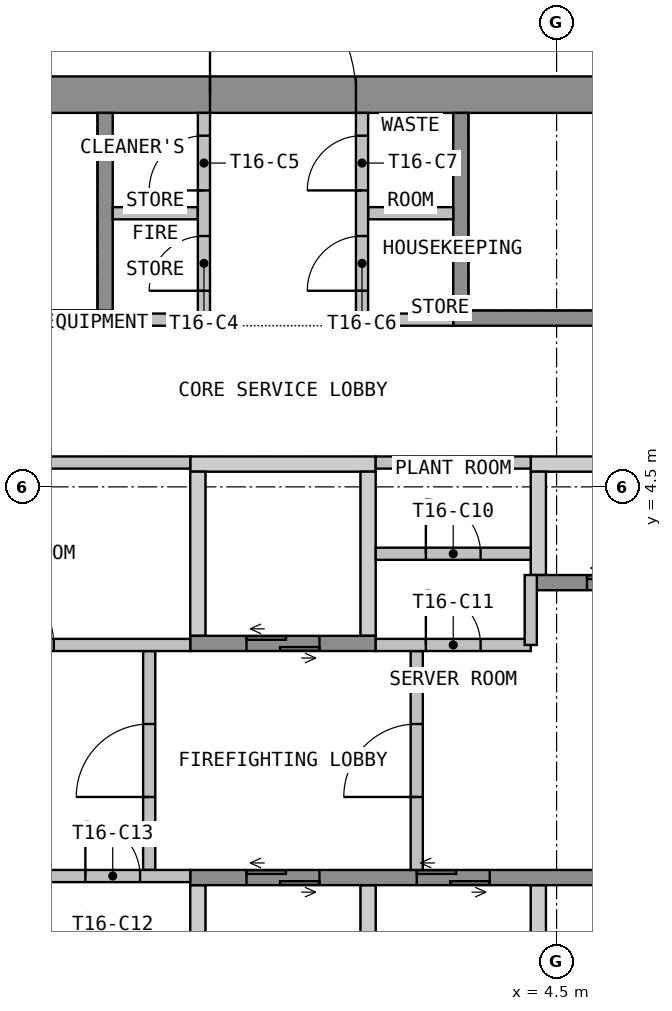
"""IFC4 building model, lengths in metres.
Left out: names, types, materials, properties, quantities, classifications, styles, units other than length and angle.
Written with IfcOpenShell. Run it as: python <this file> out.ifc"""

import sys

from ifc_helpers import new_model, si_unit, direction, frame, frame_2d, origin, place, context, subcontext, project, spatial, polyline, rectangle, outline, extrude, element, fill, save


model = new_model("IFC4")
c1 = context("Model", 3, precision=1e-05, world=origin(), true_north=direction((0.0, 1.0)))
c2 = subcontext(c1, "Body", "Model", "MODEL_VIEW")
j1 = project(units=[si_unit("LENGTHUNIT", "METRE"), si_unit("PLANEANGLEUNIT", "RADIAN")], contexts=[c1])
p1 = place(None, origin())
s1 = spatial("IfcSite", under=j1, at=p1, CompositionType="ELEMENT")
p2 = place(p1, origin())
s2 = spatial("IfcBuilding", under=s1, at=p2, CompositionType="ELEMENT")
p3 = place(p2, frame((0.0, 0.0, 219.0)))
s3 = spatial("IfcBuildingStorey", under=s2, at=p3, CompositionType="ELEMENT", Elevation=219.0)
p4 = place(p3, frame((-13.5, 10.95, 0.0), z_axis=(0.0, 0.0, 1.0), x_axis=(1.0, 0.0, 0.0)))
e1 = element("IfcWall", 1, at=p4, inside=s3, PredefinedType="SHEAR", context=c2, shape_type="SweptSolid", body=[
    extrude(rectangle(XDim=27.0, YDim=0.6, at=frame_2d((13.5, 0.0))), origin(), (0.0, 0.0, 1.0), 3.55),
])
p5 = place(p4, frame((12.3, 0.0, 0.0)))
e2 = element("IfcOpeningElement", 2, at=p5, cuts=e1, PredefinedType="OPENING", context=c2, shape_type="SweptSolid", body=[
    extrude(rectangle(XDim=2.4, YDim=2.1, at=frame_2d((1.2, 1.05))), frame((0.0, 0.31, 0.0), z_axis=(0.0, -1.0, 0.0), x_axis=(1.0, 0.0, 0.0)), (0.0, 0.0, 1.0), 0.62),
])
p6 = place(p4, frame((1.05, 0.0, 0.0)))
e3 = element("IfcOpeningElement", 3, at=p6, cuts=e1, PredefinedType="OPENING", context=c2, shape_type="SweptSolid", body=[
    extrude(rectangle(XDim=1.2, YDim=2.1, at=frame_2d((0.6, 1.05))), frame((0.0, 0.31, 0.0), z_axis=(0.0, -1.0, 0.0), x_axis=(1.0, 0.0, 0.0)), (0.0, 0.0, 1.0), 0.62),
])
p7 = place(p4, frame((24.75, 0.0, 0.0)))
e4 = element("IfcOpeningElement", 4, at=p7, cuts=e1, PredefinedType="OPENING", context=c2, shape_type="SweptSolid", body=[
    extrude(rectangle(XDim=1.2, YDim=2.1, at=frame_2d((0.6, 1.05))), frame((0.0, 0.31, 0.0), z_axis=(0.0, -1.0, 0.0), x_axis=(1.0, 0.0, 0.0)), (0.0, 0.0, 1.0), 0.62),
])
p8 = place(p3, origin())
e5 = element("IfcWall", 5, at=p8, inside=s3, PredefinedType="SHEAR", context=c2, shape_type="SweptSolid", body=[
    extrude(outline(polyline([(-1.525, 4.75), (1.525, 4.75), (1.525, 5.0), (-1.525, 5.0), (-1.525, 4.75)])), origin(), (0.0, 0.0, 1.0), 3.55),
])
p9 = place(p3, origin())
e6 = element("IfcWall", 6, at=p9, inside=s3, PredefinedType="SHEAR", context=c2, shape_type="SweptSolid", body=[
    extrude(outline(polyline([(4.075, 4.75), (12.9, 4.75), (12.9, 5.0), (4.075, 5.0), (4.075, 4.75)])), origin(), (0.0, 0.0, 1.0), 3.55),
])
p10 = place(p3, origin())
e7 = element("IfcWall", 7, at=p10, inside=s3, PredefinedType="SHEAR", context=c2, shape_type="SweptSolid", body=[
    extrude(outline(polyline([(-1.525, 2.05), (-1.275, 2.05), (-1.275, 4.75), (-1.525, 4.75), (-1.525, 2.05)])), origin(), (0.0, 0.0, 1.0), 3.55),
])
p11 = place(p3, origin())
e8 = element("IfcWall", 8, at=p11, inside=s3, PredefinedType="SHEAR", context=c2, shape_type="SweptSolid", body=[
    extrude(outline(polyline([(1.275, 2.05), (1.525, 2.05), (1.525, 4.75), (1.275, 4.75), (1.275, 2.05)])), origin(), (0.0, 0.0, 1.0), 3.55),
])
p12 = place(p3, origin())
e9 = element("IfcWall", 9, at=p12, inside=s3, PredefinedType="SHEAR", context=c2, shape_type="SweptSolid", body=[
    extrude(outline(polyline([(4.075, 3.05), (4.325, 3.05), (4.325, 4.75), (4.075, 4.75), (4.075, 3.05)])), origin(), (0.0, 0.0, 1.0), 3.55),
])
p13 = place(p3, frame((-1.525, 1.925, 0.0), z_axis=(0.0, 0.0, 1.0), x_axis=(1.0, 0.0, 0.0)))
e10 = element("IfcWall", 10, at=p13, inside=s3, PredefinedType="SHEAR", context=c2, shape_type="SweptSolid", body=[
    extrude(rectangle(XDim=3.05, YDim=0.25, at=frame_2d((1.525, 0.0))), origin(), (0.0, 0.0, 1.0), 3.55),
])
p14 = place(p13, frame((0.925, 0.0, 0.0)))
e11 = element("IfcOpeningElement", 11, at=p14, cuts=e10, PredefinedType="OPENING", context=c2, shape_type="SweptSolid", body=[
    extrude(rectangle(XDim=1.2, YDim=2.1, at=frame_2d((0.6, 1.05))), frame((0.0, 0.135, 0.0), z_axis=(0.0, -1.0, 0.0), x_axis=(1.0, 0.0, 0.0)), (0.0, 0.0, 1.0), 0.27),
])
p15 = place(p3, frame((4.075, 2.925, 0.0), z_axis=(0.0, 0.0, 1.0), x_axis=(1.0, 0.0, 0.0)))
e12 = element("IfcWall", 12, at=p15, inside=s3, PredefinedType="SHEAR", context=c2, shape_type="SweptSolid", body=[
    extrude(rectangle(XDim=5.85, YDim=0.25, at=frame_2d((2.925, 0.0))), origin(), (0.0, 0.0, 1.0), 3.55),
])
p16 = place(p15, frame((0.925, 0.0, 0.0)))
e13 = element("IfcOpeningElement", 13, at=p16, cuts=e12, PredefinedType="OPENING", context=c2, shape_type="SweptSolid", body=[
    extrude(rectangle(XDim=1.2, YDim=2.1, at=frame_2d((0.6, 1.05))), frame((0.0, 0.135, 0.0), z_axis=(0.0, -1.0, 0.0), x_axis=(1.0, 0.0, 0.0)), (0.0, 0.0, 1.0), 0.27),
])
p17 = place(p15, frame((3.725, 0.0, 0.0)))
e14 = element("IfcOpeningElement", 14, at=p17, cuts=e12, PredefinedType="OPENING", context=c2, shape_type="SweptSolid", body=[
    extrude(rectangle(XDim=1.2, YDim=2.1, at=frame_2d((0.6, 1.05))), frame((0.0, 0.135, 0.0), z_axis=(0.0, -1.0, 0.0), x_axis=(1.0, 0.0, 0.0)), (0.0, 0.0, 1.0), 0.27),
])
p18 = place(p3, origin())
e15 = element("IfcWall", 15, at=p18, inside=s3, PredefinedType="SHEAR", context=c2, shape_type="SweptSolid", body=[
    extrude(outline(polyline([(-1.525, -4.75), (-1.275, -4.75), (-1.275, -2.05), (-1.525, -2.05), (-1.525, -4.75)])), origin(), (0.0, 0.0, 1.0), 3.55),
])
p19 = place(p3, origin())
e16 = element("IfcWall", 16, at=p19, inside=s3, PredefinedType="SHEAR", context=c2, shape_type="SweptSolid", body=[
    extrude(outline(polyline([(1.275, -4.75), (1.525, -4.75), (1.525, -2.05), (1.275, -2.05), (1.275, -4.75)])), origin(), (0.0, 0.0, 1.0), 3.55),
])
p20 = place(p3, origin())
e17 = element("IfcWall", 17, at=p20, inside=s3, PredefinedType="SHEAR", context=c2, shape_type="SweptSolid", body=[
    extrude(outline(polyline([(4.075, -4.75), (4.325, -4.75), (4.325, -2.05), (4.075, -2.05), (4.075, -4.75)])), origin(), (0.0, 0.0, 1.0), 3.55),
])
p21 = place(p3, frame((-1.525, -1.925, 0.0), z_axis=(0.0, 0.0, 1.0), x_axis=(1.0, 0.0, 0.0)))
e18 = element("IfcWall", 18, at=p21, inside=s3, PredefinedType="SHEAR", context=c2, shape_type="SweptSolid", body=[
    extrude(rectangle(XDim=14.425, YDim=0.25, at=frame_2d((7.212, 0.0))), origin(), (0.0, 0.0, 1.0), 3.55),
])
p22 = place(p21, frame((0.925, 0.0, 0.0)))
e19 = element("IfcOpeningElement", 19, at=p22, cuts=e18, PredefinedType="OPENING", context=c2, shape_type="SweptSolid", body=[
    extrude(rectangle(XDim=1.2, YDim=2.1, at=frame_2d((0.6, 1.05))), frame((0.0, 0.135, 0.0), z_axis=(0.0, -1.0, 0.0), x_axis=(1.0, 0.0, 0.0)), (0.0, 0.0, 1.0), 0.27),
])
p23 = place(p21, frame((3.725, 0.0, 0.0)))
e20 = element("IfcOpeningElement", 20, at=p23, cuts=e18, PredefinedType="OPENING", context=c2, shape_type="SweptSolid", body=[
    extrude(rectangle(XDim=1.2, YDim=2.1, at=frame_2d((0.6, 1.05))), frame((0.0, 0.135, 0.0), z_axis=(0.0, -1.0, 0.0), x_axis=(1.0, 0.0, 0.0)), (0.0, 0.0, 1.0), 0.27),
])
p24 = place(p3, frame((-2.2, -1.8, 0.0), z_axis=(0.0, 0.0, 1.0), x_axis=(0.0, 1.0, 0.0)))
e21 = element("IfcWall", 21, at=p24, inside=s3, PredefinedType="PARTITIONING", context=c2, shape_type="SweptSolid", body=[
    extrude(rectangle(XDim=3.6, YDim=0.2, at=frame_2d((1.8, 0.0))), origin(), (0.0, 0.0, 1.0), 3.55),
])
p25 = place(p24, frame((1.2, 0.0, 0.0)))
e22 = element("IfcOpeningElement", 22, at=p25, cuts=e21, PredefinedType="OPENING", context=c2, shape_type="SweptSolid", body=[
    extrude(rectangle(XDim=1.2, YDim=2.1, at=frame_2d((0.6, 1.05))), frame((0.0, 0.11, 0.0), z_axis=(0.0, -1.0, 0.0), x_axis=(1.0, 0.0, 0.0)), (0.0, 0.0, 1.0), 0.22),
])
p26 = place(p3, frame((2.2, -1.8, 0.0), z_axis=(0.0, 0.0, 1.0), x_axis=(0.0, 1.0, 0.0)))
e23 = element("IfcWall", 23, at=p26, inside=s3, PredefinedType="PARTITIONING", context=c2, shape_type="SweptSolid", body=[
    extrude(rectangle(XDim=3.6, YDim=0.2, at=frame_2d((1.8, 0.0))), origin(), (0.0, 0.0, 1.0), 3.55),
])
p27 = place(p26, frame((1.2, 0.0, 0.0)))
e24 = element("IfcOpeningElement", 24, at=p27, cuts=e23, PredefinedType="OPENING", context=c2, shape_type="SweptSolid", body=[
    extrude(rectangle(XDim=1.2, YDim=2.1, at=frame_2d((0.6, 1.05))), frame((0.0, 0.11, 0.0), z_axis=(0.0, -1.0, 0.0), x_axis=(1.0, 0.0, 0.0)), (0.0, 0.0, 1.0), 0.22),
])
p28 = place(p3, frame((-12.9, 7.275, 0.0), z_axis=(0.0, 0.0, 1.0), x_axis=(1.0, 0.0, 0.0)))
e25 = element("IfcWall", 25, at=p28, inside=s3, PredefinedType="SHEAR", context=c2, shape_type="SweptSolid", body=[
    extrude(rectangle(XDim=10.1, YDim=0.25, at=frame_2d((5.05, 0.0))), origin(), (0.0, 0.0, 1.0), 3.55),
])
p29 = place(p28, frame((0.45, 0.0, 0.0)))
e26 = element("IfcOpeningElement", 26, at=p29, cuts=e25, PredefinedType="OPENING", context=c2, shape_type="SweptSolid", body=[
    extrude(rectangle(XDim=1.2, YDim=2.1, at=frame_2d((0.6, 1.05))), frame((0.0, 0.135, 0.0), z_axis=(0.0, -1.0, 0.0), x_axis=(1.0, 0.0, 0.0)), (0.0, 0.0, 1.0), 0.27),
])
p30 = place(p3, frame((-2.925, 7.4, 0.0), z_axis=(0.0, 0.0, 1.0), x_axis=(0.0, 1.0, 0.0)))
e27 = element("IfcWall", 27, at=p30, inside=s3, PredefinedType="SHEAR", context=c2, shape_type="SweptSolid", body=[
    extrude(rectangle(XDim=3.25, YDim=0.25, at=frame_2d((1.625, 0.0))), origin(), (0.0, 0.0, 1.0), 3.55),
])
p31 = place(p3, frame((2.8, 7.275, 0.0), z_axis=(0.0, 0.0, 1.0), x_axis=(1.0, 0.0, 0.0)))
e28 = element("IfcWall", 28, at=p31, inside=s3, PredefinedType="SHEAR", context=c2, shape_type="SweptSolid", body=[
    extrude(rectangle(XDim=10.1, YDim=0.25, at=frame_2d((5.05, 0.0))), origin(), (0.0, 0.0, 1.0), 3.55),
])
p32 = place(p31, frame((8.45, 0.0, 0.0)))
e29 = element("IfcOpeningElement", 29, at=p32, cuts=e28, PredefinedType="OPENING", context=c2, shape_type="SweptSolid", body=[
    extrude(rectangle(XDim=1.2, YDim=2.1, at=frame_2d((0.6, 1.05))), frame((0.0, 0.135, 0.0), z_axis=(0.0, -1.0, 0.0), x_axis=(1.0, 0.0, 0.0)), (0.0, 0.0, 1.0), 0.27),
])
p33 = place(p3, frame((2.925, 7.4, 0.0), z_axis=(0.0, 0.0, 1.0), x_axis=(0.0, 1.0, 0.0)))
e30 = element("IfcWall", 30, at=p33, inside=s3, PredefinedType="SHEAR", context=c2, shape_type="SweptSolid", body=[
    extrude(rectangle(XDim=3.25, YDim=0.25, at=frame_2d((1.625, 0.0))), origin(), (0.0, 0.0, 1.0), 3.55),
])
for number, where, z_axis, x_axis in (
    (31, (-2.8, 7.25, 0.0), (0.0, 0.0, 1.0), (1.0, 0.0, 0.0)),
    (32, (-2.8, 9.0, 0.0), (0.0, 0.0, 1.0), (1.0, 0.0, 0.0)),
    (33, (1.4, 7.25, 0.0), (0.0, 0.0, 1.0), (1.0, 0.0, 0.0)),
    (34, (1.4, 9.0, 0.0), (0.0, 0.0, 1.0), (1.0, 0.0, 0.0)),
):
    element("IfcWall", number, at=place(p3, frame(where, z_axis=z_axis, x_axis=x_axis)), inside=s3, PredefinedType="PARTITIONING", context=c2, shape_type="SweptSolid", body=[
        extrude(rectangle(XDim=1.4, YDim=0.2, at=frame_2d((0.7, 0.0))), origin(), (0.0, 0.0, 1.0), 3.55),
    ])
p34 = place(p3, frame((-1.3, 7.15, 0.0), z_axis=(0.0, 0.0, 1.0), x_axis=(0.0, 1.0, 0.0)))
e35 = element("IfcWall", 35, at=p34, inside=s3, PredefinedType="PARTITIONING", context=c2, shape_type="SweptSolid", body=[
    extrude(rectangle(XDim=3.5, YDim=0.2, at=frame_2d((1.75, 0.0))), origin(), (0.0, 0.0, 1.0), 3.55),
])
p35 = place(p34, frame((0.575, 0.0, 0.0)))
e36 = element("IfcOpeningElement", 36, at=p35, cuts=e35, PredefinedType="OPENING", context=c2, shape_type="SweptSolid", body=[
    extrude(rectangle(XDim=0.9, YDim=2.1, at=frame_2d((0.45, 1.05))), frame((0.0, 0.11, 0.0), z_axis=(0.0, -1.0, 0.0), x_axis=(1.0, 0.0, 0.0)), (0.0, 0.0, 1.0), 0.22),
])
p36 = place(p34, frame((2.225, 0.0, 0.0)))
e37 = element("IfcOpeningElement", 37, at=p36, cuts=e35, PredefinedType="OPENING", context=c2, shape_type="SweptSolid", body=[
    extrude(rectangle(XDim=0.9, YDim=2.1, at=frame_2d((0.45, 1.05))), frame((0.0, 0.11, 0.0), z_axis=(0.0, -1.0, 0.0), x_axis=(1.0, 0.0, 0.0)), (0.0, 0.0, 1.0), 0.22),
])
p37 = place(p3, frame((1.3, 7.15, 0.0), z_axis=(0.0, 0.0, 1.0), x_axis=(0.0, 1.0, 0.0)))
e38 = element("IfcWall", 38, at=p37, inside=s3, PredefinedType="PARTITIONING", context=c2, shape_type="SweptSolid", body=[
    extrude(rectangle(XDim=3.5, YDim=0.2, at=frame_2d((1.75, 0.0))), origin(), (0.0, 0.0, 1.0), 3.55),
])
p38 = place(p37, frame((0.575, 0.0, 0.0)))
e39 = element("IfcOpeningElement", 39, at=p38, cuts=e38, PredefinedType="OPENING", context=c2, shape_type="SweptSolid", body=[
    extrude(rectangle(XDim=0.9, YDim=2.1, at=frame_2d((0.45, 1.05))), frame((0.0, 0.11, 0.0), z_axis=(0.0, -1.0, 0.0), x_axis=(1.0, 0.0, 0.0)), (0.0, 0.0, 1.0), 0.22),
])
p39 = place(p37, frame((2.225, 0.0, 0.0)))
e40 = element("IfcOpeningElement", 40, at=p39, cuts=e38, PredefinedType="OPENING", context=c2, shape_type="SweptSolid", body=[
    extrude(rectangle(XDim=0.9, YDim=2.1, at=frame_2d((0.45, 1.05))), frame((0.0, 0.11, 0.0), z_axis=(0.0, -1.0, 0.0), x_axis=(1.0, 0.0, 0.0)), (0.0, 0.0, 1.0), 0.22),
])
p40 = place(p3, frame((-12.9, 1.9, 0.0), z_axis=(0.0, 0.0, 1.0), x_axis=(1.0, 0.0, 0.0)))
e41 = element("IfcWall", 41, at=p40, inside=s3, PredefinedType="PARTITIONING", context=c2, shape_type="SweptSolid", body=[
    extrude(rectangle(XDim=11.375, YDim=0.2, at=frame_2d((5.688, 0.0))), origin(), (0.0, 0.0, 1.0), 3.55),
])
p41 = place(p40, frame((2.244, 0.0, 0.0)))
e42 = element("IfcOpeningElement", 42, at=p41, cuts=e41, PredefinedType="OPENING", context=c2, shape_type="SweptSolid", body=[
    extrude(rectangle(XDim=1.2, YDim=2.1, at=frame_2d((0.6, 1.05))), frame((0.0, 0.11, 0.0), z_axis=(0.0, -1.0, 0.0), x_axis=(1.0, 0.0, 0.0)), (0.0, 0.0, 1.0), 0.22),
])
p42 = place(p40, frame((7.931, 0.0, 0.0)))
e43 = element("IfcOpeningElement", 43, at=p42, cuts=e41, PredefinedType="OPENING", context=c2, shape_type="SweptSolid", body=[
    extrude(rectangle(XDim=1.2, YDim=2.1, at=frame_2d((0.6, 1.05))), frame((0.0, 0.11, 0.0), z_axis=(0.0, -1.0, 0.0), x_axis=(1.0, 0.0, 0.0)), (0.0, 0.0, 1.0), 0.22),
])
p43 = place(p3, frame((-12.9, 4.9, 0.0), z_axis=(0.0, 0.0, 1.0), x_axis=(1.0, 0.0, 0.0)))
e44 = element("IfcWall", 44, at=p43, inside=s3, PredefinedType="PARTITIONING", context=c2, shape_type="SweptSolid", body=[
    extrude(rectangle(XDim=11.375, YDim=0.2, at=frame_2d((5.688, 0.0))), origin(), (0.0, 0.0, 1.0), 3.55),
])
p44 = place(p3, frame((1.525, 3.4, 0.0), z_axis=(0.0, 0.0, 1.0), x_axis=(1.0, 0.0, 0.0)))
e45 = element("IfcWall", 45, at=p44, inside=s3, PredefinedType="PARTITIONING", context=c2, shape_type="SweptSolid", body=[
    extrude(rectangle(XDim=2.55, YDim=0.2, at=frame_2d((1.275, 0.0))), origin(), (0.0, 0.0, 1.0), 3.55),
])
p45 = place(p44, frame((0.825, 0.0, 0.0)))
e46 = element("IfcOpeningElement", 46, at=p45, cuts=e45, PredefinedType="OPENING", context=c2, shape_type="SweptSolid", body=[
    extrude(rectangle(XDim=0.9, YDim=2.1, at=frame_2d((0.45, 1.05))), frame((0.0, 0.11, 0.0), z_axis=(0.0, -1.0, 0.0), x_axis=(1.0, 0.0, 0.0)), (0.0, 0.0, 1.0), 0.22),
])
p46 = place(p3, frame((1.525, 1.9, 0.0), z_axis=(0.0, 0.0, 1.0), x_axis=(1.0, 0.0, 0.0)))
e47 = element("IfcWall", 47, at=p46, inside=s3, PredefinedType="PARTITIONING", context=c2, shape_type="SweptSolid", body=[
    extrude(rectangle(XDim=2.55, YDim=0.2, at=frame_2d((1.275, 0.0))), origin(), (0.0, 0.0, 1.0), 3.55),
])
p47 = place(p46, frame((0.825, 0.0, 0.0)))
e48 = element("IfcOpeningElement", 48, at=p47, cuts=e47, PredefinedType="OPENING", context=c2, shape_type="SweptSolid", body=[
    extrude(rectangle(XDim=0.9, YDim=2.1, at=frame_2d((0.45, 1.05))), frame((0.0, 0.11, 0.0), z_axis=(0.0, -1.0, 0.0), x_axis=(1.0, 0.0, 0.0)), (0.0, 0.0, 1.0), 0.22),
])
p48 = place(p3, frame((1.525, 4.9, 0.0), z_axis=(0.0, 0.0, 1.0), x_axis=(1.0, 0.0, 0.0)))
e49 = element("IfcWall", 49, at=p48, inside=s3, PredefinedType="PARTITIONING", context=c2, shape_type="SweptSolid", body=[
    extrude(rectangle(XDim=2.55, YDim=0.2, at=frame_2d((1.275, 0.0))), origin(), (0.0, 0.0, 1.0), 3.55),
])
p49 = place(p3, frame((4.075, 1.9, 0.0), z_axis=(0.0, 0.0, 1.0), x_axis=(0.0, 1.0, 0.0)))
e50 = element("IfcWall", 50, at=p49, inside=s3, PredefinedType="PARTITIONING", context=c2, shape_type="SweptSolid", body=[
    extrude(rectangle(XDim=1.15, YDim=0.2, at=frame_2d((0.575, 0.0))), origin(), (0.0, 0.0, 1.0), 3.55),
])
p50 = place(p3, frame((-4.075, -1.9, 0.0), z_axis=(0.0, 0.0, 1.0), x_axis=(1.0, 0.0, 0.0)))
e51 = element("IfcWall", 51, at=p50, inside=s3, PredefinedType="PARTITIONING", context=c2, shape_type="SweptSolid", body=[
    extrude(rectangle(XDim=2.55, YDim=0.2, at=frame_2d((1.275, 0.0))), origin(), (0.0, 0.0, 1.0), 3.55),
])
p51 = place(p50, frame((0.825, 0.0, 0.0)))
e52 = element("IfcOpeningElement", 52, at=p51, cuts=e51, PredefinedType="OPENING", context=c2, shape_type="SweptSolid", body=[
    extrude(rectangle(XDim=0.9, YDim=2.1, at=frame_2d((0.45, 1.05))), frame((0.0, 0.11, 0.0), z_axis=(0.0, -1.0, 0.0), x_axis=(1.0, 0.0, 0.0)), (0.0, 0.0, 1.0), 0.22),
])
p52 = place(p5, origin())
e53 = element("IfcDoor", 53, at=p52, inside=s3, OperationType="DOUBLE_DOOR_DOUBLE_SWING", PredefinedType="DOOR", context=c2, shape_type="SweptSolid", body=[
    extrude(rectangle(XDim=2.4, YDim=2.1, at=frame_2d((1.2, 1.05))), frame((0.0, 0.025, 0.0), z_axis=(0.0, -1.0, 0.0), x_axis=(1.0, 0.0, 0.0)), (0.0, 0.0, 1.0), 0.05),
])
fill(e2, e53)
p53 = place(p14, origin())
e54 = element("IfcDoor", 54, at=p53, inside=s3, OperationType="DOUBLE_DOOR_SLIDING", PredefinedType="DOOR", context=c2, shape_type="SweptSolid", body=[
    extrude(rectangle(XDim=1.2, YDim=2.1, at=frame_2d((0.6, 1.05))), frame((0.0, 0.025, 0.0), z_axis=(0.0, -1.0, 0.0), x_axis=(1.0, 0.0, 0.0)), (0.0, 0.0, 1.0), 0.05),
])
fill(e11, e54)
p54 = place(p16, origin())
e55 = element("IfcDoor", 55, at=p54, inside=s3, OperationType="DOUBLE_DOOR_SLIDING", PredefinedType="DOOR", context=c2, shape_type="SweptSolid", body=[
    extrude(rectangle(XDim=1.2, YDim=2.1, at=frame_2d((0.6, 1.05))), frame((0.0, 0.025, 0.0), z_axis=(0.0, -1.0, 0.0), x_axis=(1.0, 0.0, 0.0)), (0.0, 0.0, 1.0), 0.05),
])
fill(e13, e55)
p55 = place(p22, origin())
e56 = element("IfcDoor", 56, at=p55, inside=s3, OperationType="DOUBLE_DOOR_SLIDING", PredefinedType="DOOR", context=c2, shape_type="SweptSolid", body=[
    extrude(rectangle(XDim=1.2, YDim=2.1, at=frame_2d((0.6, 1.05))), frame((0.0, 0.025, 0.0), z_axis=(0.0, -1.0, 0.0), x_axis=(1.0, 0.0, 0.0)), (0.0, 0.0, 1.0), 0.05),
])
fill(e19, e56)
p56 = place(p23, origin())
e57 = element("IfcDoor", 57, at=p56, inside=s3, OperationType="DOUBLE_DOOR_SLIDING", PredefinedType="DOOR", context=c2, shape_type="SweptSolid", body=[
    extrude(rectangle(XDim=1.2, YDim=2.1, at=frame_2d((0.6, 1.05))), frame((0.0, 0.025, 0.0), z_axis=(0.0, -1.0, 0.0), x_axis=(1.0, 0.0, 0.0)), (0.0, 0.0, 1.0), 0.05),
])
fill(e20, e57)
p57 = place(p25, origin())
e58 = element("IfcDoor", 58, at=p57, inside=s3, OperationType="SINGLE_SWING_LEFT", PredefinedType="DOOR", context=c2, shape_type="SweptSolid", body=[
    extrude(rectangle(XDim=1.2, YDim=2.1, at=frame_2d((0.6, 1.05))), frame((0.0, 0.025, 0.0), z_axis=(0.0, -1.0, 0.0), x_axis=(1.0, 0.0, 0.0)), (0.0, 0.0, 1.0), 0.05),
])
fill(e22, e58)
p58 = place(p27, origin())
e59 = element("IfcDoor", 59, at=p58, inside=s3, OperationType="SINGLE_SWING_LEFT", PredefinedType="DOOR", context=c2, shape_type="SweptSolid", body=[
    extrude(rectangle(XDim=1.2, YDim=2.1, at=frame_2d((0.6, 1.05))), frame((0.0, 0.025, 0.0), z_axis=(0.0, -1.0, 0.0), x_axis=(1.0, 0.0, 0.0)), (0.0, 0.0, 1.0), 0.05),
])
fill(e24, e59)
p59 = place(p35, origin())
e60 = element("IfcDoor", 60, at=p59, inside=s3, OperationType="SINGLE_SWING_LEFT", PredefinedType="DOOR", context=c2, shape_type="SweptSolid", body=[
    extrude(rectangle(XDim=0.9, YDim=2.1, at=frame_2d((0.45, 1.05))), frame((0.0, 0.025, 0.0), z_axis=(0.0, -1.0, 0.0), x_axis=(1.0, 0.0, 0.0)), (0.0, 0.0, 1.0), 0.05),
])
fill(e36, e60)
p60 = place(p36, origin())
e61 = element("IfcDoor", 61, at=p60, inside=s3, OperationType="SINGLE_SWING_LEFT", PredefinedType="DOOR", context=c2, shape_type="SweptSolid", body=[
    extrude(rectangle(XDim=0.9, YDim=2.1, at=frame_2d((0.45, 1.05))), frame((0.0, 0.025, 0.0), z_axis=(0.0, -1.0, 0.0), x_axis=(1.0, 0.0, 0.0)), (0.0, 0.0, 1.0), 0.05),
])
fill(e37, e61)
p61 = place(p38, origin())
e62 = element("IfcDoor", 62, at=p61, inside=s3, OperationType="SINGLE_SWING_LEFT", PredefinedType="DOOR", context=c2, shape_type="SweptSolid", body=[
    extrude(rectangle(XDim=0.9, YDim=2.1, at=frame_2d((0.45, 1.05))), frame((0.0, 0.025, 0.0), z_axis=(0.0, -1.0, 0.0), x_axis=(1.0, 0.0, 0.0)), (0.0, 0.0, 1.0), 0.05),
])
fill(e39, e62)
p62 = place(p39, origin())
e63 = element("IfcDoor", 63, at=p62, inside=s3, OperationType="SINGLE_SWING_LEFT", PredefinedType="DOOR", context=c2, shape_type="SweptSolid", body=[
    extrude(rectangle(XDim=0.9, YDim=2.1, at=frame_2d((0.45, 1.05))), frame((0.0, 0.025, 0.0), z_axis=(0.0, -1.0, 0.0), x_axis=(1.0, 0.0, 0.0)), (0.0, 0.0, 1.0), 0.05),
])
fill(e40, e63)
p63 = place(p42, origin())
e64 = element("IfcDoor", 64, at=p63, inside=s3, OperationType="SINGLE_SWING_RIGHT", PredefinedType="DOOR", context=c2, shape_type="SweptSolid", body=[
    extrude(rectangle(XDim=1.2, YDim=2.1, at=frame_2d((0.6, 1.05))), frame((0.0, 0.025, 0.0), z_axis=(0.0, -1.0, 0.0), x_axis=(1.0, 0.0, 0.0)), (0.0, 0.0, 1.0), 0.05),
])
fill(e43, e64)
p64 = place(p45, origin())
e65 = element("IfcDoor", 65, at=p64, inside=s3, OperationType="SINGLE_SWING_LEFT", PredefinedType="DOOR", context=c2, shape_type="SweptSolid", body=[
    extrude(rectangle(XDim=0.9, YDim=2.1, at=frame_2d((0.45, 1.05))), frame((0.0, 0.025, 0.0), z_axis=(0.0, -1.0, 0.0), x_axis=(1.0, 0.0, 0.0)), (0.0, 0.0, 1.0), 0.05),
])
fill(e46, e65)
p65 = place(p47, origin())
e66 = element("IfcDoor", 66, at=p65, inside=s3, OperationType="SINGLE_SWING_LEFT", PredefinedType="DOOR", context=c2, shape_type="SweptSolid", body=[
    extrude(rectangle(XDim=0.9, YDim=2.1, at=frame_2d((0.45, 1.05))), frame((0.0, 0.025, 0.0), z_axis=(0.0, -1.0, 0.0), x_axis=(1.0, 0.0, 0.0)), (0.0, 0.0, 1.0), 0.05),
])
fill(e48, e66)
p66 = place(p51, origin())
e67 = element("IfcDoor", 67, at=p66, inside=s3, OperationType="SINGLE_SWING_LEFT", PredefinedType="DOOR", context=c2, shape_type="SweptSolid", body=[
    extrude(rectangle(XDim=0.9, YDim=2.1, at=frame_2d((0.45, 1.05))), frame((0.0, 0.025, 0.0), z_axis=(0.0, -1.0, 0.0), x_axis=(1.0, 0.0, 0.0)), (0.0, 0.0, 1.0), 0.05),
])
fill(e52, e67)
save(model, sys.argv[1])
